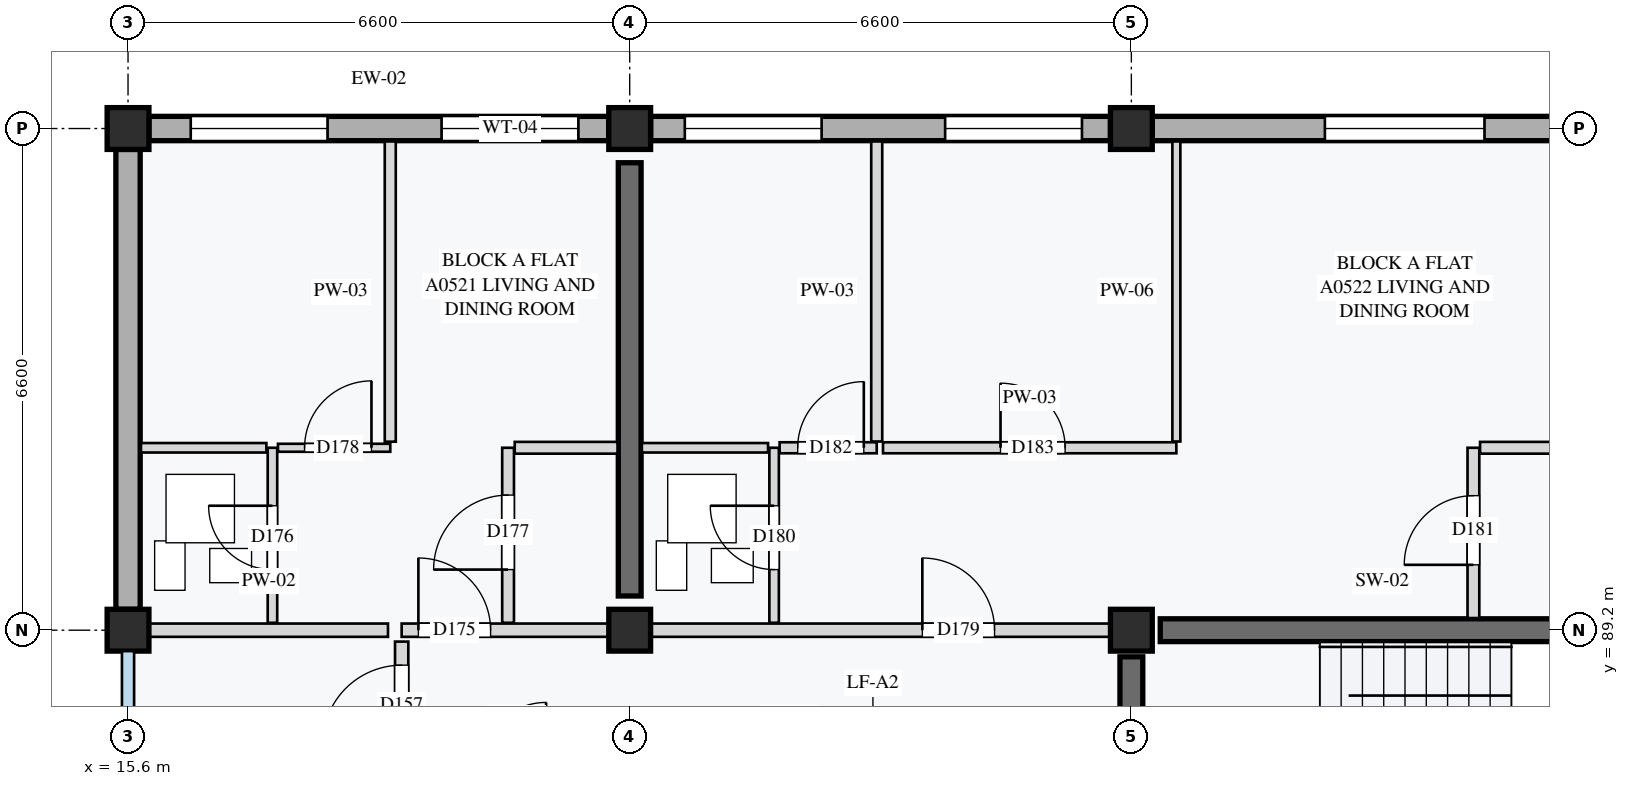
"""IFC4 building model, lengths in metres.
Left out: names, types, materials, properties, quantities, classifications, styles, units other than length and angle.
Written with IfcOpenShell. Run it as: python <this file> out.ifc"""

import sys

from ifc_helpers import new_model, si_unit, direction, frame, frame_2d, origin, origin_2d, place, context, subcontext, project, spatial, rectangle, extrude, element, fill, save


model = new_model("IFC4")
c1 = context("Model", 3, precision=1e-05, world=origin(), true_north=direction((0.0, 1.0)))
c2 = subcontext(c1, "Body", "Model", "MODEL_VIEW")
j1 = project(units=[si_unit("LENGTHUNIT", "METRE"), si_unit("PLANEANGLEUNIT", "RADIAN")], contexts=[c1])
p1 = place(None, origin())
s1 = spatial("IfcSite", under=j1, at=p1, CompositionType="ELEMENT")
p2 = place(p1, origin())
s2 = spatial("IfcBuilding", under=s1, at=p2, CompositionType="ELEMENT")
p3 = place(p2, frame((0.0, 0.0, 18.0)))
s3 = spatial("IfcBuildingStorey", under=s2, at=p3, CompositionType="ELEMENT", Elevation=18.0)
for number, where, z_axis, x_axis in (
    (1, (15.6, 89.2, 0.0), (0.0, 0.0, 1.0), (1.0, 0.0, 0.0)),
    (2, (15.6, 95.8, 0.0), (0.0, 0.0, 1.0), (1.0, 0.0, 0.0)),
    (3, (22.2, 89.2, 0.0), (0.0, 0.0, 1.0), (1.0, 0.0, 0.0)),
    (4, (22.2, 95.8, 0.0), (0.0, 0.0, 1.0), (1.0, 0.0, 0.0)),
    (5, (28.8, 89.2, 0.0), (0.0, 0.0, 1.0), (1.0, 0.0, 0.0)),
    (6, (28.8, 95.8, 0.0), (0.0, 0.0, 1.0), (1.0, 0.0, 0.0)),
):
    element("IfcColumn", number, at=place(p3, frame(where, z_axis=z_axis, x_axis=x_axis)), inside=s3, PredefinedType="COLUMN", context=c2, shape_type="SweptSolid", body=[
        extrude(rectangle(XDim=0.55, YDim=0.55, at=origin_2d()), origin(), (0.0, 0.0, 1.0), 3.2),
    ])
p4 = place(p3, frame((29.18, 89.2, 0.0), z_axis=(0.0, 0.0, 1.0), x_axis=(1.0, 0.0, 0.0)))
e7 = element("IfcWall", 7, at=p4, inside=s3, PredefinedType="SHEAR", context=c2, shape_type="SweptSolid", body=[
    extrude(rectangle(XDim=5.84, YDim=0.3, at=frame_2d((2.92, 0.0))), origin(), (0.0, 0.0, 1.0), 2.96),
])
p5 = place(p3, frame((28.8, 86.05, 0.0), z_axis=(0.0, 0.0, 1.0), x_axis=(0.0, 1.0, 0.0)))
e8 = element("IfcWall", 8, at=p5, inside=s3, PredefinedType="SHEAR", context=c2, shape_type="SweptSolid", body=[
    extrude(rectangle(XDim=2.8, YDim=0.3, at=frame_2d((1.4, 0.0))), origin(), (0.0, 0.0, 1.0), 2.96),
])
p6 = place(p3, frame((22.2, 89.65, 0.0), z_axis=(0.0, 0.0, 1.0), x_axis=(0.0, 1.0, 0.0)))
e9 = element("IfcWall", 9, at=p6, inside=s3, PredefinedType="SHEAR", context=c2, shape_type="SweptSolid", body=[
    extrude(rectangle(XDim=5.7, YDim=0.3, at=frame_2d((2.85, 0.0))), origin(), (0.0, 0.0, 1.0), 2.96),
])
p7 = place(p3, frame((15.875, 95.8, 0.0), z_axis=(0.0, 0.0, 1.0), x_axis=(1.0, 0.0, 0.0)))
e10 = element("IfcWall", 10, at=p7, inside=s3, PredefinedType="STANDARD", context=c2, shape_type="SweptSolid", body=[
    extrude(rectangle(XDim=6.05, YDim=0.32, at=frame_2d((3.025, 0.0))), origin(), (0.0, 0.0, 1.0), 2.65),
])
p8 = place(p7, frame((0.55, 0.0, 0.85)))
e11 = element("IfcOpeningElement", 11, at=p8, cuts=e10, PredefinedType="OPENING", context=c2, shape_type="SweptSolid", body=[
    extrude(rectangle(XDim=1.8, YDim=1.35, at=frame_2d((0.9, 0.675))), frame((0.0, 0.17, 0.0), z_axis=(0.0, -1.0, 0.0), x_axis=(1.0, 0.0, 0.0)), (0.0, 0.0, 1.0), 0.34),
])
p9 = place(p7, frame((3.85, 0.0, 0.85)))
e12 = element("IfcOpeningElement", 12, at=p9, cuts=e10, PredefinedType="OPENING", context=c2, shape_type="SweptSolid", body=[
    extrude(rectangle(XDim=1.8, YDim=1.55, at=frame_2d((0.9, 0.775))), frame((0.0, 0.17, 0.0), z_axis=(0.0, -1.0, 0.0), x_axis=(1.0, 0.0, 0.0)), (0.0, 0.0, 1.0), 0.34),
])
p10 = place(p3, frame((22.475, 95.8, 0.0), z_axis=(0.0, 0.0, 1.0), x_axis=(1.0, 0.0, 0.0)))
e13 = element("IfcWall", 13, at=p10, inside=s3, PredefinedType="STANDARD", context=c2, shape_type="SweptSolid", body=[
    extrude(rectangle(XDim=6.05, YDim=0.32, at=frame_2d((3.025, 0.0))), origin(), (0.0, 0.0, 1.0), 2.65),
])
p11 = place(p10, frame((0.45, 0.0, 0.85)))
e14 = element("IfcOpeningElement", 14, at=p11, cuts=e13, PredefinedType="OPENING", context=c2, shape_type="SweptSolid", body=[
    extrude(rectangle(XDim=1.8, YDim=1.35, at=frame_2d((0.9, 0.675))), frame((0.0, 0.17, 0.0), z_axis=(0.0, -1.0, 0.0), x_axis=(1.0, 0.0, 0.0)), (0.0, 0.0, 1.0), 0.34),
])
p12 = place(p10, frame((3.875, 0.0, 0.85)))
e15 = element("IfcOpeningElement", 15, at=p12, cuts=e13, PredefinedType="OPENING", context=c2, shape_type="SweptSolid", body=[
    extrude(rectangle(XDim=1.8, YDim=1.35, at=frame_2d((0.9, 0.675))), frame((0.0, 0.17, 0.0), z_axis=(0.0, -1.0, 0.0), x_axis=(1.0, 0.0, 0.0)), (0.0, 0.0, 1.0), 0.34),
])
p13 = place(p3, frame((29.075, 95.8, 0.0), z_axis=(0.0, 0.0, 1.0), x_axis=(1.0, 0.0, 0.0)))
e16 = element("IfcWall", 16, at=p13, inside=s3, PredefinedType="STANDARD", context=c2, shape_type="SweptSolid", body=[
    extrude(rectangle(XDim=6.05, YDim=0.32, at=frame_2d((3.025, 0.0))), origin(), (0.0, 0.0, 1.0), 2.65),
])
p14 = place(p13, frame((2.271, 0.0, 0.85)))
e17 = element("IfcOpeningElement", 17, at=p14, cuts=e16, PredefinedType="OPENING", context=c2, shape_type="SweptSolid", body=[
    extrude(rectangle(XDim=2.1, YDim=1.55, at=frame_2d((1.05, 0.775))), frame((0.0, 0.17, 0.0), z_axis=(0.0, -1.0, 0.0), x_axis=(1.0, 0.0, 0.0)), (0.0, 0.0, 1.0), 0.34),
])
p15 = place(p3, frame((15.6, 89.475, 0.0), z_axis=(0.0, 0.0, 1.0), x_axis=(0.0, 1.0, 0.0)))
e18 = element("IfcWall", 18, at=p15, inside=s3, PredefinedType="STANDARD", context=c2, shape_type="SweptSolid", body=[
    extrude(rectangle(XDim=6.05, YDim=0.32, at=frame_2d((3.025, 0.0))), origin(), (0.0, 0.0, 1.0), 2.65),
])
p16 = place(p3, frame((19.2, 86.05, 0.0), z_axis=(0.0, 0.0, 1.0), x_axis=(0.0, 1.0, 0.0)))
e19 = element("IfcWall", 19, at=p16, inside=s3, PredefinedType="PARTITIONING", context=c2, shape_type="SweptSolid", body=[
    extrude(rectangle(XDim=3.0, YDim=0.175, at=frame_2d((1.5, 0.0))), origin(), (0.0, 0.0, 1.0), 2.96),
])
p17 = place(p16, frame((1.65, 0.0, 0.0)))
e20 = element("IfcOpeningElement", 20, at=p17, cuts=e19, PredefinedType="OPENING", context=c2, shape_type="SweptSolid", body=[
    extrude(rectangle(XDim=1.04, YDim=2.12, at=frame_2d((0.52, 1.06))), frame((0.0, 0.097, 0.0), z_axis=(0.0, -1.0, 0.0), x_axis=(1.0, 0.0, 0.0)), (0.0, 0.0, 1.0), 0.195),
])
p18 = place(p3, frame((15.88, 89.2, 0.0), z_axis=(0.0, 0.0, 1.0), x_axis=(1.0, 0.0, 0.0)))
e21 = element("IfcWall", 21, at=p18, inside=s3, PredefinedType="PARTITIONING", context=c2, shape_type="SweptSolid", body=[
    extrude(rectangle(XDim=3.14, YDim=0.175, at=frame_2d((1.57, 0.0))), origin(), (0.0, 0.0, 1.0), 2.55),
])
p19 = place(p3, frame((19.2, 89.2, 0.0), z_axis=(0.0, 0.0, 1.0), x_axis=(1.0, 0.0, 0.0)))
e22 = element("IfcWall", 22, at=p19, inside=s3, PredefinedType="PARTITIONING", context=c2, shape_type="SweptSolid", body=[
    extrude(rectangle(XDim=3.0, YDim=0.175, at=frame_2d((1.5, 0.0))), origin(), (0.0, 0.0, 1.0), 2.55),
])
p20 = place(p19, frame((0.22, 0.0, 0.0)))
e23 = element("IfcOpeningElement", 23, at=p20, cuts=e22, PredefinedType="OPENING", context=c2, shape_type="SweptSolid", body=[
    extrude(rectangle(XDim=0.95, YDim=2.16, at=frame_2d((0.475, 1.08))), frame((0.0, 0.097, 0.0), z_axis=(0.0, -1.0, 0.0), x_axis=(1.0, 0.0, 0.0)), (0.0, 0.0, 1.0), 0.195),
])
p21 = place(p3, frame((17.5, 89.298, 0.0), z_axis=(0.0, 0.0, 1.0), x_axis=(0.0, 1.0, 0.0)))
e24 = element("IfcWall", 24, at=p21, inside=s3, PredefinedType="PARTITIONING", context=c2, shape_type="SweptSolid", body=[
    extrude(rectangle(XDim=2.302, YDim=0.125, at=frame_2d((1.151, 0.0))), origin(), (0.0, 0.0, 1.0), 2.96),
])
p22 = place(p21, frame((0.7, 0.0, 0.0)))
e25 = element("IfcOpeningElement", 25, at=p22, cuts=e24, PredefinedType="OPENING", context=c2, shape_type="SweptSolid", body=[
    extrude(rectangle(XDim=0.84, YDim=2.06, at=frame_2d((0.42, 1.03))), frame((0.0, 0.073, 0.0), z_axis=(0.0, -1.0, 0.0), x_axis=(1.0, 0.0, 0.0)), (0.0, 0.0, 1.0), 0.145),
])
p23 = place(p3, frame((15.77, 91.6, 0.0), z_axis=(0.0, 0.0, 1.0), x_axis=(1.0, 0.0, 0.0)))
e26 = element("IfcWall", 26, at=p23, inside=s3, PredefinedType="PARTITIONING", context=c2, shape_type="SweptSolid", body=[
    extrude(rectangle(XDim=1.65, YDim=0.125, at=frame_2d((0.825, 0.0))), origin(), (0.0, 0.0, 1.0), 2.96),
])
p24 = place(p3, frame((20.6, 89.298, 0.0), z_axis=(0.0, 0.0, 1.0), x_axis=(0.0, 1.0, 0.0)))
e27 = element("IfcWall", 27, at=p24, inside=s3, PredefinedType="PARTITIONING", context=c2, shape_type="SweptSolid", body=[
    extrude(rectangle(XDim=2.302, YDim=0.155, at=frame_2d((1.151, 0.0))), origin(), (0.0, 0.0, 1.0), 2.96),
])
p25 = place(p24, frame((0.7, 0.0, 0.0)))
e28 = element("IfcOpeningElement", 28, at=p25, cuts=e27, PredefinedType="OPENING", context=c2, shape_type="SweptSolid", body=[
    extrude(rectangle(XDim=0.98, YDim=2.12, at=frame_2d((0.49, 1.06))), frame((0.0, 0.087, 0.0), z_axis=(0.0, -1.0, 0.0), x_axis=(1.0, 0.0, 0.0)), (0.0, 0.0, 1.0), 0.175),
])
p26 = place(p3, frame((20.688, 91.6, 0.0), z_axis=(0.0, 0.0, 1.0), x_axis=(1.0, 0.0, 0.0)))
e29 = element("IfcWall", 29, at=p26, inside=s3, PredefinedType="PARTITIONING", context=c2, shape_type="SweptSolid", body=[
    extrude(rectangle(XDim=1.353, YDim=0.155, at=frame_2d((0.676, 0.0))), origin(), (0.0, 0.0, 1.0), 2.96),
])
p27 = place(p3, frame((17.573, 91.6, 0.0), z_axis=(0.0, 0.0, 1.0), x_axis=(1.0, 0.0, 0.0)))
e30 = element("IfcWall", 30, at=p27, inside=s3, PredefinedType="PARTITIONING", context=c2, shape_type="SweptSolid", body=[
    extrude(rectangle(XDim=1.478, YDim=0.105, at=frame_2d((0.739, 0.0))), origin(), (0.0, 0.0, 1.0), 2.96),
])
p28 = place(p27, frame((0.35, 0.0, 0.0)))
e31 = element("IfcOpeningElement", 31, at=p28, cuts=e30, PredefinedType="OPENING", context=c2, shape_type="SweptSolid", body=[
    extrude(rectangle(XDim=0.88, YDim=2.1, at=frame_2d((0.44, 1.05))), frame((0.0, 0.062, 0.0), z_axis=(0.0, -1.0, 0.0), x_axis=(1.0, 0.0, 0.0)), (0.0, 0.0, 1.0), 0.125),
])
p29 = place(p3, frame((19.05, 91.68, 0.0), z_axis=(0.0, 0.0, 1.0), x_axis=(0.0, 1.0, 0.0)))
e32 = element("IfcWall", 32, at=p29, inside=s3, PredefinedType="PARTITIONING", context=c2, shape_type="SweptSolid", body=[
    extrude(rectangle(XDim=3.95, YDim=0.145, at=frame_2d((1.975, 0.0))), origin(), (0.0, 0.0, 1.0), 2.96),
])
p30 = place(p3, frame((22.2, 89.2, 0.0), z_axis=(0.0, 0.0, 1.0), x_axis=(1.0, 0.0, 0.0)))
e33 = element("IfcWall", 33, at=p30, inside=s3, PredefinedType="PARTITIONING", context=c2, shape_type="SweptSolid", body=[
    extrude(rectangle(XDim=6.6, YDim=0.175, at=frame_2d((3.3, 0.0))), origin(), (0.0, 0.0, 1.0), 2.55),
])
p31 = place(p30, frame((3.85, 0.0, 0.0)))
e34 = element("IfcOpeningElement", 34, at=p31, cuts=e33, PredefinedType="OPENING", context=c2, shape_type="SweptSolid", body=[
    extrude(rectangle(XDim=0.95, YDim=2.16, at=frame_2d((0.475, 1.08))), frame((0.0, 0.097, 0.0), z_axis=(0.0, -1.0, 0.0), x_axis=(1.0, 0.0, 0.0)), (0.0, 0.0, 1.0), 0.195),
])
p32 = place(p3, frame((24.1, 89.298, 0.0), z_axis=(0.0, 0.0, 1.0), x_axis=(0.0, 1.0, 0.0)))
e35 = element("IfcWall", 35, at=p32, inside=s3, PredefinedType="PARTITIONING", context=c2, shape_type="SweptSolid", body=[
    extrude(rectangle(XDim=2.302, YDim=0.125, at=frame_2d((1.151, 0.0))), origin(), (0.0, 0.0, 1.0), 2.96),
])
p33 = place(p32, frame((0.7, 0.0, 0.0)))
e36 = element("IfcOpeningElement", 36, at=p33, cuts=e35, PredefinedType="OPENING", context=c2, shape_type="SweptSolid", body=[
    extrude(rectangle(XDim=0.84, YDim=2.06, at=frame_2d((0.42, 1.03))), frame((0.0, 0.073, 0.0), z_axis=(0.0, -1.0, 0.0), x_axis=(1.0, 0.0, 0.0)), (0.0, 0.0, 1.0), 0.145),
])
p34 = place(p3, frame((22.36, 91.6, 0.0), z_axis=(0.0, 0.0, 1.0), x_axis=(1.0, 0.0, 0.0)))
e37 = element("IfcWall", 37, at=p34, inside=s3, PredefinedType="PARTITIONING", context=c2, shape_type="SweptSolid", body=[
    extrude(rectangle(XDim=1.66, YDim=0.125, at=frame_2d((0.83, 0.0))), origin(), (0.0, 0.0, 1.0), 2.96),
])
p35 = place(p3, frame((33.3, 89.36, 0.0), z_axis=(0.0, 0.0, 1.0), x_axis=(0.0, 1.0, 0.0)))
e38 = element("IfcWall", 38, at=p35, inside=s3, PredefinedType="PARTITIONING", context=c2, shape_type="SweptSolid", body=[
    extrude(rectangle(XDim=2.24, YDim=0.155, at=frame_2d((1.12, 0.0))), origin(), (0.0, 0.0, 1.0), 2.96),
])
p36 = place(p35, frame((0.7, 0.0, 0.0)))
e39 = element("IfcOpeningElement", 39, at=p36, cuts=e38, PredefinedType="OPENING", context=c2, shape_type="SweptSolid", body=[
    extrude(rectangle(XDim=0.91, YDim=2.14, at=frame_2d((0.455, 1.07))), frame((0.0, 0.087, 0.0), z_axis=(0.0, -1.0, 0.0), x_axis=(1.0, 0.0, 0.0)), (0.0, 0.0, 1.0), 0.175),
])
p37 = place(p3, frame((33.387, 91.6, 0.0), z_axis=(0.0, 0.0, 1.0), x_axis=(1.0, 0.0, 0.0)))
e40 = element("IfcWall", 40, at=p37, inside=s3, PredefinedType="PARTITIONING", context=c2, shape_type="SweptSolid", body=[
    extrude(rectangle(XDim=1.853, YDim=0.155, at=frame_2d((0.926, 0.0))), origin(), (0.0, 0.0, 1.0), 2.96),
])
p38 = place(p3, frame((24.173, 91.6, 0.0), z_axis=(0.0, 0.0, 1.0), x_axis=(1.0, 0.0, 0.0)))
e41 = element("IfcWall", 41, at=p38, inside=s3, PredefinedType="PARTITIONING", context=c2, shape_type="SweptSolid", body=[
    extrude(rectangle(XDim=1.277, YDim=0.145, at=frame_2d((0.639, 0.0))), origin(), (0.0, 0.0, 1.0), 2.96),
])
p39 = place(p38, frame((0.238, 0.0, 0.0)))
e42 = element("IfcOpeningElement", 42, at=p39, cuts=e41, PredefinedType="OPENING", context=c2, shape_type="SweptSolid", body=[
    extrude(rectangle(XDim=0.87, YDim=2.08, at=frame_2d((0.435, 1.04))), frame((0.0, 0.083, 0.0), z_axis=(0.0, -1.0, 0.0), x_axis=(1.0, 0.0, 0.0)), (0.0, 0.0, 1.0), 0.165),
])
p40 = place(p3, frame((25.45, 91.683, 0.0), z_axis=(0.0, 0.0, 1.0), x_axis=(0.0, 1.0, 0.0)))
e43 = element("IfcWall", 43, at=p40, inside=s3, PredefinedType="PARTITIONING", context=c2, shape_type="SweptSolid", body=[
    extrude(rectangle(XDim=3.947, YDim=0.145, at=frame_2d((1.974, 0.0))), origin(), (0.0, 0.0, 1.0), 2.96),
])
p41 = place(p3, frame((25.532, 91.6, 0.0), z_axis=(0.0, 0.0, 1.0), x_axis=(1.0, 0.0, 0.0)))
e44 = element("IfcWall", 44, at=p41, inside=s3, PredefinedType="PARTITIONING", context=c2, shape_type="SweptSolid", body=[
    extrude(rectangle(XDim=3.86, YDim=0.145, at=frame_2d((1.93, 0.0))), origin(), (0.0, 0.0, 1.0), 2.96),
])
p42 = place(p41, frame((1.546, 0.0, 0.0)))
e45 = element("IfcOpeningElement", 45, at=p42, cuts=e44, PredefinedType="OPENING", context=c2, shape_type="SweptSolid", body=[
    extrude(rectangle(XDim=0.85, YDim=2.1, at=frame_2d((0.425, 1.05))), frame((0.0, 0.083, 0.0), z_axis=(0.0, -1.0, 0.0), x_axis=(1.0, 0.0, 0.0)), (0.0, 0.0, 1.0), 0.165),
])
p43 = place(p3, frame((29.392, 91.683, 0.0), z_axis=(0.0, 0.0, 1.0), x_axis=(0.0, 1.0, 0.0)))
e46 = element("IfcWall", 46, at=p43, inside=s3, PredefinedType="PARTITIONING", context=c2, shape_type="SweptSolid", body=[
    extrude(rectangle(XDim=3.947, YDim=0.105, at=frame_2d((1.974, 0.0))), origin(), (0.0, 0.0, 1.0), 2.96),
])
p44 = place(p8, origin())
e47 = element("IfcWindow", 47, at=p44, inside=s3, PartitioningType="SINGLE_PANEL", PredefinedType="WINDOW", context=c2, shape_type="SweptSolid", body=[
    extrude(rectangle(XDim=1.8, YDim=1.35, at=frame_2d((0.9, 0.675))), frame((0.0, 0.03, 0.0), z_axis=(0.0, -1.0, 0.0), x_axis=(1.0, 0.0, 0.0)), (0.0, 0.0, 1.0), 0.06),
])
fill(e11, e47)
p45 = place(p9, origin())
e48 = element("IfcWindow", 48, at=p45, inside=s3, PartitioningType="SINGLE_PANEL", PredefinedType="WINDOW", context=c2, shape_type="SweptSolid", body=[
    extrude(rectangle(XDim=1.8, YDim=1.55, at=frame_2d((0.9, 0.775))), frame((0.0, 0.03, 0.0), z_axis=(0.0, -1.0, 0.0), x_axis=(1.0, 0.0, 0.0)), (0.0, 0.0, 1.0), 0.06),
])
fill(e12, e48)
p46 = place(p11, origin())
e49 = element("IfcWindow", 49, at=p46, inside=s3, PartitioningType="SINGLE_PANEL", PredefinedType="WINDOW", context=c2, shape_type="SweptSolid", body=[
    extrude(rectangle(XDim=1.8, YDim=1.35, at=frame_2d((0.9, 0.675))), frame((0.0, 0.03, 0.0), z_axis=(0.0, -1.0, 0.0), x_axis=(1.0, 0.0, 0.0)), (0.0, 0.0, 1.0), 0.06),
])
fill(e14, e49)
p47 = place(p12, origin())
e50 = element("IfcWindow", 50, at=p47, inside=s3, PartitioningType="SINGLE_PANEL", PredefinedType="WINDOW", context=c2, shape_type="SweptSolid", body=[
    extrude(rectangle(XDim=1.8, YDim=1.35, at=frame_2d((0.9, 0.675))), frame((0.0, 0.03, 0.0), z_axis=(0.0, -1.0, 0.0), x_axis=(1.0, 0.0, 0.0)), (0.0, 0.0, 1.0), 0.06),
])
fill(e15, e50)
p48 = place(p14, origin())
e51 = element("IfcWindow", 51, at=p48, inside=s3, PartitioningType="SINGLE_PANEL", PredefinedType="WINDOW", context=c2, shape_type="SweptSolid", body=[
    extrude(rectangle(XDim=2.1, YDim=1.55, at=frame_2d((1.05, 0.775))), frame((0.0, 0.03, 0.0), z_axis=(0.0, -1.0, 0.0), x_axis=(1.0, 0.0, 0.0)), (0.0, 0.0, 1.0), 0.06),
])
fill(e17, e51)
p49 = place(p17, origin())
e52 = element("IfcDoor", 52, at=p49, inside=s3, OperationType="SINGLE_SWING_LEFT", PredefinedType="DOOR", context=c2, shape_type="SweptSolid", body=[
    extrude(rectangle(XDim=1.04, YDim=2.12, at=frame_2d((0.52, 1.06))), frame((0.0, 0.025, 0.0), z_axis=(0.0, -1.0, 0.0), x_axis=(1.0, 0.0, 0.0)), (0.0, 0.0, 1.0), 0.05),
])
fill(e20, e52)
p50 = place(p20, origin())
e53 = element("IfcDoor", 53, at=p50, inside=s3, OperationType="SINGLE_SWING_LEFT", PredefinedType="DOOR", context=c2, shape_type="SweptSolid", body=[
    extrude(rectangle(XDim=0.95, YDim=2.16, at=frame_2d((0.475, 1.08))), frame((0.0, 0.025, 0.0), z_axis=(0.0, -1.0, 0.0), x_axis=(1.0, 0.0, 0.0)), (0.0, 0.0, 1.0), 0.05),
])
fill(e23, e53)
p51 = place(p22, origin())
e54 = element("IfcDoor", 54, at=p51, inside=s3, OperationType="SINGLE_SWING_RIGHT", PredefinedType="DOOR", context=c2, shape_type="SweptSolid", body=[
    extrude(rectangle(XDim=0.84, YDim=2.06, at=frame_2d((0.42, 1.03))), frame((0.0, 0.025, 0.0), z_axis=(0.0, -1.0, 0.0), x_axis=(1.0, 0.0, 0.0)), (0.0, 0.0, 1.0), 0.05),
])
fill(e25, e54)
p52 = place(p25, origin())
e55 = element("IfcDoor", 55, at=p52, inside=s3, OperationType="SINGLE_SWING_LEFT", PredefinedType="DOOR", context=c2, shape_type="SweptSolid", body=[
    extrude(rectangle(XDim=0.98, YDim=2.12, at=frame_2d((0.49, 1.06))), frame((0.0, 0.025, 0.0), z_axis=(0.0, -1.0, 0.0), x_axis=(1.0, 0.0, 0.0)), (0.0, 0.0, 1.0), 0.05),
])
fill(e28, e55)
p53 = place(p28, origin())
e56 = element("IfcDoor", 56, at=p53, inside=s3, OperationType="SINGLE_SWING_RIGHT", PredefinedType="DOOR", context=c2, shape_type="SweptSolid", body=[
    extrude(rectangle(XDim=0.88, YDim=2.1, at=frame_2d((0.44, 1.05))), frame((0.0, 0.025, 0.0), z_axis=(0.0, -1.0, 0.0), x_axis=(1.0, 0.0, 0.0)), (0.0, 0.0, 1.0), 0.05),
])
fill(e31, e56)
p54 = place(p31, origin())
e57 = element("IfcDoor", 57, at=p54, inside=s3, OperationType="SINGLE_SWING_LEFT", PredefinedType="DOOR", context=c2, shape_type="SweptSolid", body=[
    extrude(rectangle(XDim=0.95, YDim=2.16, at=frame_2d((0.475, 1.08))), frame((0.0, 0.025, 0.0), z_axis=(0.0, -1.0, 0.0), x_axis=(1.0, 0.0, 0.0)), (0.0, 0.0, 1.0), 0.05),
])
fill(e34, e57)
p55 = place(p33, origin())
e58 = element("IfcDoor", 58, at=p55, inside=s3, OperationType="SINGLE_SWING_RIGHT", PredefinedType="DOOR", context=c2, shape_type="SweptSolid", body=[
    extrude(rectangle(XDim=0.84, YDim=2.06, at=frame_2d((0.42, 1.03))), frame((0.0, 0.025, 0.0), z_axis=(0.0, -1.0, 0.0), x_axis=(1.0, 0.0, 0.0)), (0.0, 0.0, 1.0), 0.05),
])
fill(e36, e58)
p56 = place(p36, origin())
e59 = element("IfcDoor", 59, at=p56, inside=s3, OperationType="SINGLE_SWING_LEFT", PredefinedType="DOOR", context=c2, shape_type="SweptSolid", body=[
    extrude(rectangle(XDim=0.91, YDim=2.14, at=frame_2d((0.455, 1.07))), frame((0.0, 0.025, 0.0), z_axis=(0.0, -1.0, 0.0), x_axis=(1.0, 0.0, 0.0)), (0.0, 0.0, 1.0), 0.05),
])
fill(e39, e59)
p57 = place(p39, origin())
e60 = element("IfcDoor", 60, at=p57, inside=s3, OperationType="SINGLE_SWING_RIGHT", PredefinedType="DOOR", context=c2, shape_type="SweptSolid", body=[
    extrude(rectangle(XDim=0.87, YDim=2.08, at=frame_2d((0.435, 1.04))), frame((0.0, 0.025, 0.0), z_axis=(0.0, -1.0, 0.0), x_axis=(1.0, 0.0, 0.0)), (0.0, 0.0, 1.0), 0.05),
])
fill(e42, e60)
p58 = place(p42, origin())
e61 = element("IfcDoor", 61, at=p58, inside=s3, OperationType="SINGLE_SWING_LEFT", PredefinedType="DOOR", context=c2, shape_type="SweptSolid", body=[
    extrude(rectangle(XDim=0.85, YDim=2.1, at=frame_2d((0.425, 1.05))), frame((0.0, 0.025, 0.0), z_axis=(0.0, -1.0, 0.0), x_axis=(1.0, 0.0, 0.0)), (0.0, 0.0, 1.0), 0.05),
])
fill(e45, e61)
save(model, sys.argv[1])
